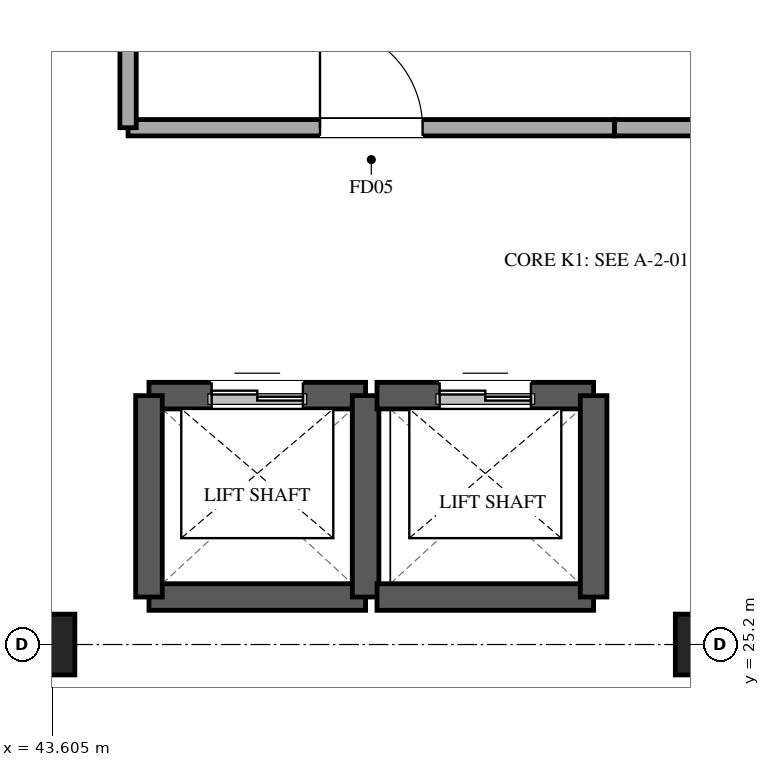
"""IFC4 building model, lengths in metres.
Left out: names, types, materials, properties, quantities, classifications, styles, units other than length and angle.
Written with IfcOpenShell. Run it as: python <this file> out.ifc"""

import sys

from ifc_helpers import new_model, si_unit, direction, frame, frame_2d, origin, origin_2d, place, context, subcontext, project, spatial, rectangle, extrude, element, fill, save


model = new_model("IFC4")
c1 = context("Model", 3, precision=1e-05, world=origin(), true_north=direction((0.0, 1.0)))
c2 = subcontext(c1, "Body", "Model", "MODEL_VIEW")
j1 = project(units=[si_unit("LENGTHUNIT", "METRE"), si_unit("PLANEANGLEUNIT", "RADIAN")], contexts=[c1])
p1 = place(None, origin())
s1 = spatial("IfcSite", under=j1, at=p1, CompositionType="ELEMENT")
p2 = place(p1, origin())
s2 = spatial("IfcBuilding", under=s1, at=p2, CompositionType="ELEMENT")
p3 = place(p2, frame((0.0, 0.0, 16.5)))
s3 = spatial("IfcBuildingStorey", under=s2, at=p3, CompositionType="ELEMENT", Elevation=16.5)
for number, where, z_axis, x_axis in (
    (1, (43.5, 25.2, 0.0), (0.0, 0.0, 1.0), (1.0, 0.0, 0.0)),
    (2, (52.2, 25.2, 0.0), (0.0, 0.0, 1.0), (1.0, 0.0, 0.0)),
):
    element("IfcColumn", number, at=place(p3, frame(where, z_axis=z_axis, x_axis=x_axis)), inside=s3, PredefinedType="COLUMN", context=c2, shape_type="SweptSolid", body=[
        extrude(rectangle(XDim=0.8, YDim=0.8, at=origin_2d()), origin(), (0.0, 0.0, 1.0), 5.1),
    ])
p4 = place(p3, frame((44.875, 28.475, 0.0), z_axis=(0.0, 0.0, 1.0), x_axis=(1.0, 0.0, 0.0)))
e3 = element("IfcWall", 3, at=p4, inside=s3, PredefinedType="SHEAR", context=c2, shape_type="SweptSolid", body=[
    extrude(rectangle(XDim=2.85, YDim=0.35, at=frame_2d((1.425, 0.0))), origin(), (0.0, 0.0, 1.0), 5.1),
])
p5 = place(p4, frame((0.825, 0.0, 0.0)))
e4 = element("IfcOpeningElement", 4, at=p5, cuts=e3, PredefinedType="OPENING", context=c2, shape_type="SweptSolid", body=[
    extrude(rectangle(XDim=1.2, YDim=2.2, at=frame_2d((0.6, 1.1))), frame((0.0, 0.185, 0.0), z_axis=(0.0, -1.0, 0.0), x_axis=(1.0, 0.0, 0.0)), (0.0, 0.0, 1.0), 0.37),
])
p6 = place(p3, frame((47.725, 25.825, 0.0), z_axis=(0.0, 0.0, 1.0), x_axis=(-1.0, 0.0, 0.0)))
e5 = element("IfcWall", 5, at=p6, inside=s3, PredefinedType="SHEAR", context=c2, shape_type="SweptSolid", body=[
    extrude(rectangle(XDim=2.85, YDim=0.35, at=frame_2d((1.425, 0.0))), origin(), (0.0, 0.0, 1.0), 5.1),
])
for number, where, z_axis, x_axis in (
    (6, (44.875, 25.825, 0.0), (0.0, 0.0, 1.0), (0.0, 1.0, 0.0)),
    (7, (47.725, 28.475, 0.0), (0.0, 0.0, 1.0), (0.0, -1.0, 0.0)),
):
    element("IfcWall", number, at=place(p3, frame(where, z_axis=z_axis, x_axis=x_axis)), inside=s3, PredefinedType="SHEAR", context=c2, shape_type="SweptSolid", body=[
        extrude(rectangle(XDim=2.65, YDim=0.35, at=frame_2d((1.325, 0.0))), origin(), (0.0, 0.0, 1.0), 5.1),
    ])
p7 = place(p3, frame((47.875, 28.475, 0.0), z_axis=(0.0, 0.0, 1.0), x_axis=(1.0, 0.0, 0.0)))
e8 = element("IfcWall", 8, at=p7, inside=s3, PredefinedType="SHEAR", context=c2, shape_type="SweptSolid", body=[
    extrude(rectangle(XDim=2.85, YDim=0.35, at=frame_2d((1.425, 0.0))), origin(), (0.0, 0.0, 1.0), 5.1),
])
p8 = place(p7, frame((0.825, 0.0, 0.0)))
e9 = element("IfcOpeningElement", 9, at=p8, cuts=e8, PredefinedType="OPENING", context=c2, shape_type="SweptSolid", body=[
    extrude(rectangle(XDim=1.2, YDim=2.2, at=frame_2d((0.6, 1.1))), frame((0.0, 0.185, 0.0), z_axis=(0.0, -1.0, 0.0), x_axis=(1.0, 0.0, 0.0)), (0.0, 0.0, 1.0), 0.37),
])
p9 = place(p3, frame((50.725, 25.825, 0.0), z_axis=(0.0, 0.0, 1.0), x_axis=(-1.0, 0.0, 0.0)))
e10 = element("IfcWall", 10, at=p9, inside=s3, PredefinedType="SHEAR", context=c2, shape_type="SweptSolid", body=[
    extrude(rectangle(XDim=2.85, YDim=0.35, at=frame_2d((1.425, 0.0))), origin(), (0.0, 0.0, 1.0), 5.1),
])
p10 = place(p3, frame((50.725, 28.475, 0.0), z_axis=(0.0, 0.0, 1.0), x_axis=(0.0, -1.0, 0.0)))
e11 = element("IfcWall", 11, at=p10, inside=s3, PredefinedType="SHEAR", context=c2, shape_type="SweptSolid", body=[
    extrude(rectangle(XDim=2.65, YDim=0.35, at=frame_2d((1.325, 0.0))), origin(), (0.0, 0.0, 1.0), 5.1),
])
p11 = place(p3, frame((44.6, 32.0, 0.0), z_axis=(0.0, 0.0, 1.0), x_axis=(1.0, 0.0, 0.0)))
e12 = element("IfcWall", 12, at=p11, inside=s3, PredefinedType="PARTITIONING", context=c2, shape_type="SweptSolid", body=[
    extrude(rectangle(XDim=6.4, YDim=0.215, at=frame_2d((3.2, 0.0))), origin(), (0.0, 0.0, 1.0), 4.76),
])
p12 = place(p11, frame((2.525, 0.0, 0.0)))
e13 = element("IfcOpeningElement", 13, at=p12, cuts=e12, PredefinedType="OPENING", context=c2, shape_type="SweptSolid", body=[
    extrude(rectangle(XDim=1.35, YDim=2.2, at=frame_2d((0.675, 1.1))), frame((0.0, 0.118, 0.0), z_axis=(0.0, -1.0, 0.0), x_axis=(1.0, 0.0, 0.0)), (0.0, 0.0, 1.0), 0.235),
])
p13 = place(p3, frame((44.6, 32.0, 0.0), z_axis=(0.0, 0.0, 1.0), x_axis=(0.0, 1.0, 0.0)))
e14 = element("IfcWall", 14, at=p13, inside=s3, PredefinedType="PARTITIONING", context=c2, shape_type="SweptSolid", body=[
    extrude(rectangle(XDim=2.98, YDim=0.215, at=frame_2d((1.49, 0.0))), origin(), (0.0, 0.0, 1.0), 4.06),
])
p14 = place(p3, frame((52.8, 32.0, 0.0), z_axis=(0.0, 0.0, 1.0), x_axis=(-1.0, 0.0, 0.0)))
e15 = element("IfcWall", 15, at=p14, inside=s3, PredefinedType="PARTITIONING", context=c2, shape_type="SweptSolid", body=[
    extrude(rectangle(XDim=1.8, YDim=0.215, at=frame_2d((0.9, 0.0))), origin(), (0.0, 0.0, 1.0), 4.06),
])
p15 = place(p5, origin())
e16 = element("IfcDoor", 16, at=p15, inside=s3, OperationType="DOUBLE_DOOR_SLIDING", PredefinedType="DOOR", context=c2, shape_type="SweptSolid", body=[
    extrude(rectangle(XDim=1.2, YDim=2.2, at=frame_2d((0.6, 1.1))), frame((0.0, 0.025, 0.0), z_axis=(0.0, -1.0, 0.0), x_axis=(1.0, 0.0, 0.0)), (0.0, 0.0, 1.0), 0.05),
])
fill(e4, e16)
p16 = place(p8, origin())
e17 = element("IfcDoor", 17, at=p16, inside=s3, OperationType="DOUBLE_DOOR_SLIDING", PredefinedType="DOOR", context=c2, shape_type="SweptSolid", body=[
    extrude(rectangle(XDim=1.2, YDim=2.2, at=frame_2d((0.6, 1.1))), frame((0.0, 0.025, 0.0), z_axis=(0.0, -1.0, 0.0), x_axis=(1.0, 0.0, 0.0)), (0.0, 0.0, 1.0), 0.05),
])
fill(e9, e17)
p17 = place(p12, origin())
e18 = element("IfcDoor", 18, at=p17, inside=s3, OperationType="SINGLE_SWING_LEFT", PredefinedType="DOOR", context=c2, shape_type="SweptSolid", body=[
    extrude(rectangle(XDim=1.35, YDim=2.2, at=frame_2d((0.675, 1.1))), frame((0.0, 0.025, 0.0), z_axis=(0.0, -1.0, 0.0), x_axis=(1.0, 0.0, 0.0)), (0.0, 0.0, 1.0), 0.05),
])
fill(e13, e18)
save(model, sys.argv[1])
